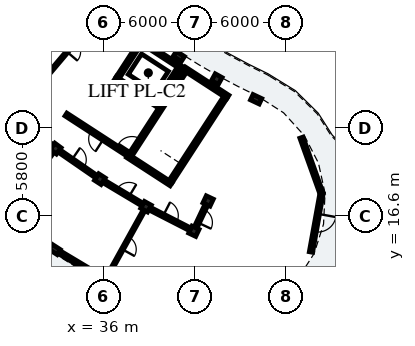
"""IFC4 building model, lengths in metres.
Left out: names, types, materials, properties, quantities, classifications, styles, units other than length and angle.
Written with IfcOpenShell. Run it as: python <this file> out.ifc"""

import sys

from ifc_helpers import new_model, si_unit, direction, frame, frame_2d, origin, origin_2d, place, context, subcontext, project, spatial, rectangle, extrude, element, fill, save


model = new_model("IFC4")
c1 = context("Model", 3, precision=1e-05, world=origin(), true_north=direction((0.0, 1.0)))
c2 = subcontext(c1, "Body", "Model", "MODEL_VIEW")
j1 = project(units=[si_unit("LENGTHUNIT", "METRE"), si_unit("PLANEANGLEUNIT", "RADIAN")], contexts=[c1])
p1 = place(None, origin())
s1 = spatial("IfcSite", under=j1, at=p1, CompositionType="ELEMENT")
p2 = place(p1, origin())
s2 = spatial("IfcBuilding", under=s1, at=p2, CompositionType="ELEMENT")
p3 = place(p2, frame((0.0, 0.0, 35.72)))
s3 = spatial("IfcBuildingStorey", under=s2, at=p3, CompositionType="ELEMENT", Elevation=35.72)
p4 = place(p3, frame((40.413, 18.882, 0.0), z_axis=(0.0, 0.0, 1.0), x_axis=(0.544629435258, 0.838676802022, 0.0)))
e1 = element("IfcWall", 1, at=p4, inside=s3, PredefinedType="SHEAR", context=c2, shape_type="SweptSolid", body=[
    extrude(rectangle(XDim=6.6, YDim=0.25, at=frame_2d((3.3, 0.0))), origin(), (0.0, 0.0, 1.0), 3.11),
])
p5 = place(p3, frame((44.18, 24.454, 0.0), z_axis=(0.0, 0.0, 1.0), x_axis=(-0.838699580527, 0.544594356953, 0.0)))
e2 = element("IfcWall", 2, at=p5, inside=s3, PredefinedType="SHEAR", context=c2, shape_type="SweptSolid", body=[
    extrude(rectangle(XDim=3.42, YDim=0.25, at=frame_2d((1.71, 0.0))), origin(), (0.0, 0.0, 1.0), 3.11),
])
p6 = place(p3, frame((40.449, 18.709, 0.0), z_axis=(0.0, 0.0, 1.0), x_axis=(-0.838678407117, 0.544626963559, 0.0)))
e3 = element("IfcWall", 3, at=p6, inside=s3, PredefinedType="SHEAR", context=c2, shape_type="SweptSolid", body=[
    extrude(rectangle(XDim=3.42, YDim=0.25, at=frame_2d((1.71, 0.0))), origin(), (0.0, 0.0, 1.0), 3.11),
])
p7 = place(p3, frame((37.754, 20.608, 0.0), z_axis=(0.0, 0.0, 1.0), x_axis=(0.544655453679, 0.838659905312, 0.0)))
e4 = element("IfcWall", 4, at=p7, inside=s3, PredefinedType="SHEAR", context=c2, shape_type="SweptSolid", body=[
    extrude(rectangle(XDim=6.6, YDim=0.25, at=frame_2d((3.3, 0.0))), origin(), (0.0, 0.0, 1.0), 3.11),
])
p8 = place(p7, frame((0.22, 0.0, 0.0)))
e5 = element("IfcOpeningElement", 5, at=p8, cuts=e4, PredefinedType="OPENING", context=c2, shape_type="SweptSolid", body=[
    extrude(rectangle(XDim=1.05, YDim=2.15, at=frame_2d((0.525, 1.075))), frame((0.0, 0.135, 0.0), z_axis=(0.0, -1.0, 0.0), x_axis=(1.0, 0.0, 0.0)), (0.0, 0.0, 1.0), 0.27),
])
p9 = place(p3, frame((39.516, 23.917, 0.0), z_axis=(0.0, 0.0, 1.0), x_axis=(-0.838660840752, 0.544654013286, 0.0)))
e6 = element("IfcWall", 6, at=p9, inside=s3, PredefinedType="SHEAR", context=c2, shape_type="SweptSolid", body=[
    extrude(rectangle(XDim=3.26, YDim=0.23, at=frame_2d((1.63, 0.0))), origin(), (0.0, 0.0, 1.0), 3.11),
])
p10 = place(p9, frame((0.9, 0.0, 0.0)))
e7 = element("IfcOpeningElement", 7, at=p10, cuts=e6, PredefinedType="OPENING", context=c2, shape_type="SweptSolid", body=[
    extrude(rectangle(XDim=1.0, YDim=2.15, at=frame_2d((0.5, 1.075))), frame((0.0, 0.125, 0.0), z_axis=(0.0, -1.0, 0.0), x_axis=(1.0, 0.0, 0.0)), (0.0, 0.0, 1.0), 0.25),
])
p11 = place(p3, frame((41.112, 26.375, 0.0), z_axis=(0.0, 0.0, 1.0), x_axis=(-0.838638623546, 0.544688221919, 0.0)))
e8 = element("IfcWall", 8, at=p11, inside=s3, PredefinedType="SHEAR", context=c2, shape_type="SweptSolid", body=[
    extrude(rectangle(XDim=3.26, YDim=0.23, at=frame_2d((1.63, 0.0))), origin(), (0.0, 0.0, 1.0), 3.11),
])
p12 = place(p3, frame((39.482, 24.077, 0.0), z_axis=(0.0, 0.0, 1.0), x_axis=(0.544686387605, 0.838639814913, 0.0)))
e9 = element("IfcWall", 9, at=p12, inside=s3, PredefinedType="SHEAR", context=c2, shape_type="SweptSolid", body=[
    extrude(rectangle(XDim=2.7, YDim=0.23, at=frame_2d((1.35, 0.0))), origin(), (0.0, 0.0, 1.0), 3.11),
])
p13 = place(p3, frame((36.941, 25.727, 0.0), z_axis=(0.0, 0.0, 1.0), x_axis=(0.544622789439, 0.838681117722, 0.0)))
e10 = element("IfcWall", 10, at=p13, inside=s3, PredefinedType="SHEAR", context=c2, shape_type="SweptSolid", body=[
    extrude(rectangle(XDim=2.7, YDim=0.23, at=frame_2d((1.35, 0.0))), origin(), (0.0, 0.0, 1.0), 3.11),
])
p14 = place(p3, frame((32.85, 21.052, 0.0), z_axis=(0.0, 0.0, 1.0), x_axis=(-0.594822786751, -0.803856860617, 0.0)))
e11 = element("IfcColumn", 11, at=p14, inside=s3, PredefinedType="COLUMN", context=c2, shape_type="SweptSolid", body=[
    extrude(rectangle(XDim=0.51, YDim=0.51, at=origin_2d()), origin(), (0.0, 0.0, 1.0), 3.125),
])
p15 = place(p3, frame((40.954, 27.116, 0.0), z_axis=(0.0, 0.0, 1.0), x_axis=(-0.540974471368, -0.841039012964, 0.0)))
e12 = element("IfcColumn", 12, at=p15, inside=s3, PredefinedType="PILASTER", context=c2, shape_type="SweptSolid", body=[
    extrude(rectangle(XDim=0.39, YDim=0.63, at=origin_2d()), origin(), (0.0, 0.0, 1.0), 3.125),
])
p16 = place(p3, frame((35.76, 19.042, 0.0), z_axis=(0.0, 0.0, 1.0), x_axis=(-0.540974471368, -0.841039012964, 0.0)))
e13 = element("IfcColumn", 13, at=p16, inside=s3, PredefinedType="COLUMN", context=c2, shape_type="SweptSolid", body=[
    extrude(rectangle(XDim=0.51, YDim=0.51, at=origin_2d()), origin(), (0.0, 0.0, 1.0), 3.125),
])
p17 = place(p3, frame((32.785, 14.416, 0.0), z_axis=(0.0, 0.0, 1.0), x_axis=(-0.540974471368, -0.841039012964, 0.0)))
e14 = element("IfcColumn", 14, at=p17, inside=s3, PredefinedType="PILASTER", context=c2, shape_type="SweptSolid", body=[
    extrude(rectangle(XDim=0.39, YDim=0.63, at=origin_2d()), origin(), (0.0, 0.0, 1.0), 3.125),
])
for number, where, z_axis, x_axis in (
    (15, (43.45, 25.623, 0.0), (0.0, 0.0, 1.0), (-0.485, -0.875, 0.0)),
    (16, (38.796, 17.227, 0.0), (0.0, 0.0, 1.0), (-0.485, -0.875, 0.0)),
):
    element("IfcColumn", number, at=place(p3, frame(where, z_axis=z_axis, x_axis=x_axis)), inside=s3, PredefinedType="COLUMN", context=c2, shape_type="SweptSolid", body=[
        extrude(rectangle(XDim=0.51, YDim=0.51, at=origin_2d()), origin(), (0.0, 0.0, 1.0), 3.125),
    ])
p18 = place(p3, frame((46.039, 24.297, 0.0), z_axis=(0.0, 0.0, 1.0), x_axis=(-0.426568739901, -0.904455145454, 0.0)))
e17 = element("IfcColumn", 17, at=p18, inside=s3, PredefinedType="PILASTER", context=c2, shape_type="SweptSolid", body=[
    extrude(rectangle(XDim=0.39, YDim=0.63, at=origin_2d()), origin(), (0.0, 0.0, 1.0), 3.125),
])
for number, where, z_axis, x_axis in (
    (18, (42.882, 17.604, 0.0), (0.0, 0.0, 1.0), (-0.427, -0.904, 0.0)),
    (19, (41.944, 15.614, 0.0), (0.0, 0.0, 1.0), (-0.427, -0.904, 0.0)),
):
    element("IfcColumn", number, at=place(p3, frame(where, z_axis=z_axis, x_axis=x_axis)), inside=s3, PredefinedType="COLUMN", context=c2, shape_type="SweptSolid", body=[
        extrude(rectangle(XDim=0.51, YDim=0.51, at=origin_2d()), origin(), (0.0, 0.0, 1.0), 3.125),
    ])
p19 = place(p3, frame((29.763, 16.502, 0.0), z_axis=(0.0, 0.0, 1.0), x_axis=(0.822878299875, -0.568217655125, 0.0)))
e20 = element("IfcWall", 20, at=p19, inside=s3, PredefinedType="SOLIDWALL", context=c2, shape_type="SweptSolid", body=[
    extrude(rectangle(XDim=3.507, YDim=0.22, at=frame_2d((1.753, 0.0))), origin(), (0.0, 0.0, 1.0), 2.355),
])
p20 = place(p19, frame((1.213, 0.0, 0.55)))
e21 = element("IfcOpeningElement", 21, at=p20, cuts=e20, PredefinedType="OPENING", context=c2, shape_type="SweptSolid", body=[
    extrude(rectangle(XDim=1.08, YDim=1.45, at=frame_2d((0.54, 0.725))), frame((0.0, 0.12, 0.0), z_axis=(0.0, -1.0, 0.0), x_axis=(1.0, 0.0, 0.0)), (0.0, 0.0, 1.0), 0.24),
])
p21 = place(p3, frame((32.927, 14.332, 0.0), z_axis=(0.0, 0.0, 1.0), x_axis=(0.858272027283, -0.513195018666, 0.0)))
e22 = element("IfcWall", 22, at=p21, inside=s3, PredefinedType="SOLIDWALL", context=c2, shape_type="SweptSolid", body=[
    extrude(rectangle(XDim=3.507, YDim=0.22, at=frame_2d((1.753, 0.0))), origin(), (0.0, 0.0, 1.0), 2.355),
])
p22 = place(p21, frame((1.063, 0.0, 0.55)))
e23 = element("IfcOpeningElement", 23, at=p22, cuts=e22, PredefinedType="OPENING", context=c2, shape_type="SweptSolid", body=[
    extrude(rectangle(XDim=1.38, YDim=1.56, at=frame_2d((0.69, 0.78))), frame((0.0, 0.12, 0.0), z_axis=(0.0, -1.0, 0.0), x_axis=(1.0, 0.0, 0.0)), (0.0, 0.0, 1.0), 0.24),
])
p23 = place(p3, frame((49.022, 21.772, 0.0), z_axis=(0.0, 0.0, 1.0), x_axis=(0.337903065186, -0.941180917007, 0.0)))
e24 = element("IfcWall", 24, at=p23, inside=s3, PredefinedType="SOLIDWALL", context=c2, shape_type="SweptSolid", body=[
    extrude(rectangle(XDim=3.908, YDim=0.22, at=frame_2d((1.954, 0.0))), origin(), (0.0, 0.0, 1.0), 2.355),
])
p24 = place(p23, frame((1.029, 0.0, 0.4)))
e25 = element("IfcOpeningElement", 25, at=p24, cuts=e24, PredefinedType="OPENING", context=c2, shape_type="SweptSolid", body=[
    extrude(rectangle(XDim=1.85, YDim=1.72, at=frame_2d((0.925, 0.86))), frame((0.0, 0.12, 0.0), z_axis=(0.0, -1.0, 0.0), x_axis=(1.0, 0.0, 0.0)), (0.0, 0.0, 1.0), 0.24),
])
p25 = place(p3, frame((50.343, 18.094, 0.0), z_axis=(0.0, 0.0, 1.0), x_axis=(-0.177978291347, -0.984034413935, 0.0)))
e26 = element("IfcWall", 26, at=p25, inside=s3, PredefinedType="SOLIDWALL", context=c2, shape_type="SweptSolid", body=[
    extrude(rectangle(XDim=3.908, YDim=0.22, at=frame_2d((1.954, 0.0))), origin(), (0.0, 0.0, 1.0), 2.355),
])
p26 = place(p25, frame((1.354, 0.0, 0.0)))
e27 = element("IfcOpeningElement", 27, at=p26, cuts=e26, PredefinedType="OPENING", context=c2, shape_type="SweptSolid", body=[
    extrude(rectangle(XDim=1.2, YDim=2.15, at=frame_2d((0.6, 1.075))), frame((0.0, 0.12, 0.0), z_axis=(0.0, -1.0, 0.0), x_axis=(1.0, 0.0, 0.0)), (0.0, 0.0, 1.0), 0.24),
])
p27 = place(p3, frame((37.639, 20.623, 0.0), z_axis=(0.0, 0.0, 1.0), x_axis=(-0.838681446513, 0.544622283124, 0.0)))
e28 = element("IfcWall", 28, at=p27, inside=s3, PredefinedType="PARTITIONING", context=c2, shape_type="SweptSolid", body=[
    extrude(rectangle(XDim=4.9, YDim=0.22, at=frame_2d((2.45, 0.0))), origin(), (0.0, 0.0, 1.0), 2.34),
])
p28 = place(p27, frame((1.95, 0.0, 0.0)))
e29 = element("IfcOpeningElement", 29, at=p28, cuts=e28, PredefinedType="OPENING", context=c2, shape_type="SweptSolid", body=[
    extrude(rectangle(XDim=0.98, YDim=2.14, at=frame_2d((0.49, 1.07))), frame((0.0, 0.12, 0.0), z_axis=(0.0, -1.0, 0.0), x_axis=(1.0, 0.0, 0.0)), (0.0, 0.0, 1.0), 0.24),
])
p29 = place(p3, frame((36.021, 30.269, 0.0), z_axis=(0.0, 0.0, 1.0), x_axis=(-0.646121311019, -0.763234728932, 0.0)))
e30 = element("IfcWall", 30, at=p29, inside=s3, PredefinedType="PARTITIONING", context=c2, shape_type="SweptSolid", body=[
    extrude(rectangle(XDim=6.6, YDim=0.125, at=frame_2d((3.3, 0.0))), origin(), (0.0, 0.0, 1.0), 2.37),
])
p30 = place(p29, frame((2.855, 0.0, 0.0)))
e31 = element("IfcOpeningElement", 31, at=p30, cuts=e30, PredefinedType="OPENING", context=c2, shape_type="SweptSolid", body=[
    extrude(rectangle(XDim=0.89, YDim=2.1, at=frame_2d((0.445, 1.05))), frame((0.0, 0.073, 0.0), z_axis=(0.0, -1.0, 0.0), x_axis=(1.0, 0.0, 0.0)), (0.0, 0.0, 1.0), 0.145),
])
p31 = place(p3, frame((30.351, 23.03, 0.0), z_axis=(0.0, 0.0, 1.0), x_axis=(0.783965548427, -0.620804332201, 0.0)))
e32 = element("IfcWall", 32, at=p31, inside=s3, PredefinedType="PARTITIONING", context=c2, shape_type="SweptSolid", body=[
    extrude(rectangle(XDim=2.837, YDim=0.195, at=frame_2d((1.418, 0.0))), origin(), (0.0, 0.0, 1.0), 2.37),
])
p32 = place(p31, frame((0.934, 0.0, 0.0)))
e33 = element("IfcOpeningElement", 33, at=p32, cuts=e32, PredefinedType="OPENING", context=c2, shape_type="SweptSolid", body=[
    extrude(rectangle(XDim=0.97, YDim=2.15, at=frame_2d((0.485, 1.075))), frame((0.0, 0.107, 0.0), z_axis=(0.0, -1.0, 0.0), x_axis=(1.0, 0.0, 0.0)), (0.0, 0.0, 1.0), 0.215),
])
p33 = place(p3, frame((32.612, 20.73, 0.0), z_axis=(0.0, 0.0, 1.0), x_axis=(-0.59482622273, -0.803854318116, 0.0)))
e34 = element("IfcWall", 34, at=p33, inside=s3, PredefinedType="PARTITIONING", context=c2, shape_type="SweptSolid", body=[
    extrude(rectangle(XDim=4.7, YDim=0.125, at=frame_2d((2.35, 0.0))), origin(), (0.0, 0.0, 1.0), 2.37),
])
p34 = place(p33, frame((1.905, 0.0, 0.0)))
e35 = element("IfcOpeningElement", 35, at=p34, cuts=e34, PredefinedType="OPENING", context=c2, shape_type="SweptSolid", body=[
    extrude(rectangle(XDim=0.89, YDim=2.1, at=frame_2d((0.445, 1.05))), frame((0.0, 0.073, 0.0), z_axis=(0.0, -1.0, 0.0), x_axis=(1.0, 0.0, 0.0)), (0.0, 0.0, 1.0), 0.145),
])
p35 = place(p3, frame((33.138, 20.853, 0.0), z_axis=(0.0, 0.0, 1.0), x_axis=(0.822870075235, -0.568229565653, 0.0)))
e36 = element("IfcWall", 36, at=p35, inside=s3, PredefinedType="PARTITIONING", context=c2, shape_type="SweptSolid", body=[
    extrude(rectangle(XDim=2.837, YDim=0.195, at=frame_2d((1.418, 0.0))), origin(), (0.0, 0.0, 1.0), 2.37),
])
p36 = place(p35, frame((0.944, 0.0, 0.0)))
e37 = element("IfcOpeningElement", 37, at=p36, cuts=e36, PredefinedType="OPENING", context=c2, shape_type="SweptSolid", body=[
    extrude(rectangle(XDim=0.95, YDim=2.13, at=frame_2d((0.475, 1.065))), frame((0.0, 0.107, 0.0), z_axis=(0.0, -1.0, 0.0), x_axis=(1.0, 0.0, 0.0)), (0.0, 0.0, 1.0), 0.215),
])
p37 = place(p3, frame((36.061, 18.862, 0.0), z_axis=(0.0, 0.0, 1.0), x_axis=(0.858281647443, -0.51317892948, 0.0)))
e38 = element("IfcWall", 38, at=p37, inside=s3, PredefinedType="PARTITIONING", context=c2, shape_type="SweptSolid", body=[
    extrude(rectangle(XDim=2.837, YDim=0.195, at=frame_2d((1.418, 0.0))), origin(), (0.0, 0.0, 1.0), 2.37),
])
p38 = place(p37, frame((0.954, 0.0, 0.0)))
e39 = element("IfcOpeningElement", 39, at=p38, cuts=e38, PredefinedType="OPENING", context=c2, shape_type="SweptSolid", body=[
    extrude(rectangle(XDim=0.93, YDim=2.12, at=frame_2d((0.465, 1.06))), frame((0.0, 0.107, 0.0), z_axis=(0.0, -1.0, 0.0), x_axis=(1.0, 0.0, 0.0)), (0.0, 0.0, 1.0), 0.215),
])
p39 = place(p3, frame((38.602, 16.877, 0.0), z_axis=(0.0, 0.0, 1.0), x_axis=(-0.484813534336, -0.874617537513, 0.0)))
e40 = element("IfcWall", 40, at=p39, inside=s3, PredefinedType="PARTITIONING", context=c2, shape_type="SweptSolid", body=[
    extrude(rectangle(XDim=4.7, YDim=0.125, at=frame_2d((2.35, 0.0))), origin(), (0.0, 0.0, 1.0), 2.37),
])
p40 = place(p39, frame((1.895, 0.0, 0.0)))
e41 = element("IfcOpeningElement", 41, at=p40, cuts=e40, PredefinedType="OPENING", context=c2, shape_type="SweptSolid", body=[
    extrude(rectangle(XDim=0.91, YDim=2.1, at=frame_2d((0.455, 1.05))), frame((0.0, 0.073, 0.0), z_axis=(0.0, -1.0, 0.0), x_axis=(1.0, 0.0, 0.0)), (0.0, 0.0, 1.0), 0.145),
])
p41 = place(p3, frame((39.107, 17.067, 0.0), z_axis=(0.0, 0.0, 1.0), x_axis=(0.890030590607, -0.45590080915, 0.0)))
e42 = element("IfcWall", 42, at=p41, inside=s3, PredefinedType="PARTITIONING", context=c2, shape_type="SweptSolid", body=[
    extrude(rectangle(XDim=2.837, YDim=0.195, at=frame_2d((1.418, 0.0))), origin(), (0.0, 0.0, 1.0), 2.37),
])
p42 = place(p41, frame((0.924, 0.0, 0.0)))
e43 = element("IfcOpeningElement", 43, at=p42, cuts=e42, PredefinedType="OPENING", context=c2, shape_type="SweptSolid", body=[
    extrude(rectangle(XDim=0.99, YDim=2.16, at=frame_2d((0.495, 1.08))), frame((0.0, 0.107, 0.0), z_axis=(0.0, -1.0, 0.0), x_axis=(1.0, 0.0, 0.0)), (0.0, 0.0, 1.0), 0.215),
])
p43 = place(p3, frame((42.861, 17.559, 0.0), z_axis=(0.0, 0.0, 1.0), x_axis=(-0.426541520305, -0.904467982549, 0.0)))
e44 = element("IfcWall", 44, at=p43, inside=s3, PredefinedType="PARTITIONING", context=c2, shape_type="SweptSolid", body=[
    extrude(rectangle(XDim=2.1, YDim=0.195, at=frame_2d((1.05, 0.0))), origin(), (0.0, 0.0, 1.0), 2.37),
])
p44 = place(p43, frame((0.57, 0.0, 0.0)))
e45 = element("IfcOpeningElement", 45, at=p44, cuts=e44, PredefinedType="OPENING", context=c2, shape_type="SweptSolid", body=[
    extrude(rectangle(XDim=0.95, YDim=2.13, at=frame_2d((0.475, 1.065))), frame((0.0, 0.107, 0.0), z_axis=(0.0, -1.0, 0.0), x_axis=(1.0, 0.0, 0.0)), (0.0, 0.0, 1.0), 0.215),
])
p45 = place(p22, origin())
e46 = element("IfcWindow", 46, at=p45, inside=s3, PartitioningType="SINGLE_PANEL", PredefinedType="WINDOW", context=c2, shape_type="SweptSolid", body=[
    extrude(rectangle(XDim=1.38, YDim=1.56, at=frame_2d((0.69, 0.78))), frame((0.0, 0.03, 0.0), z_axis=(0.0, -1.0, 0.0), x_axis=(1.0, 0.0, 0.0)), (0.0, 0.0, 1.0), 0.06),
])
fill(e23, e46)
p46 = place(p24, origin())
e47 = element("IfcWindow", 47, at=p46, inside=s3, PartitioningType="SINGLE_PANEL", PredefinedType="WINDOW", context=c2, shape_type="SweptSolid", body=[
    extrude(rectangle(XDim=1.85, YDim=1.72, at=frame_2d((0.925, 0.86))), frame((0.0, 0.03, 0.0), z_axis=(0.0, -1.0, 0.0), x_axis=(1.0, 0.0, 0.0)), (0.0, 0.0, 1.0), 0.06),
])
fill(e25, e47)
p47 = place(p26, origin())
e48 = element("IfcDoor", 48, at=p47, inside=s3, OperationType="SINGLE_SWING_LEFT", PredefinedType="DOOR", context=c2, shape_type="SweptSolid", body=[
    extrude(rectangle(XDim=1.2, YDim=2.15, at=frame_2d((0.6, 1.075))), frame((0.0, 0.025, 0.0), z_axis=(0.0, -1.0, 0.0), x_axis=(1.0, 0.0, 0.0)), (0.0, 0.0, 1.0), 0.05),
])
fill(e27, e48)
p48 = place(p8, origin())
e49 = element("IfcDoor", 49, at=p48, inside=s3, OperationType="SINGLE_SWING_LEFT", PredefinedType="DOOR", context=c2, shape_type="SweptSolid", body=[
    extrude(rectangle(XDim=1.05, YDim=2.15, at=frame_2d((0.525, 1.075))), frame((0.0, 0.025, 0.0), z_axis=(0.0, -1.0, 0.0), x_axis=(1.0, 0.0, 0.0)), (0.0, 0.0, 1.0), 0.05),
])
fill(e5, e49)
p49 = place(p10, origin())
e50 = element("IfcDoor", 50, at=p49, inside=s3, OperationType="DOUBLE_DOOR_SLIDING", PredefinedType="DOOR", context=c2, shape_type="SweptSolid", body=[
    extrude(rectangle(XDim=1.0, YDim=2.15, at=frame_2d((0.5, 1.075))), frame((0.0, 0.025, 0.0), z_axis=(0.0, -1.0, 0.0), x_axis=(1.0, 0.0, 0.0)), (0.0, 0.0, 1.0), 0.05),
])
fill(e7, e50)
p50 = place(p28, origin())
e51 = element("IfcDoor", 51, at=p50, inside=s3, OperationType="SINGLE_SWING_LEFT", PredefinedType="DOOR", context=c2, shape_type="SweptSolid", body=[
    extrude(rectangle(XDim=0.98, YDim=2.14, at=frame_2d((0.49, 1.07))), frame((0.0, 0.025, 0.0), z_axis=(0.0, -1.0, 0.0), x_axis=(1.0, 0.0, 0.0)), (0.0, 0.0, 1.0), 0.05),
])
fill(e29, e51)
p51 = place(p36, origin())
e52 = element("IfcDoor", 52, at=p51, inside=s3, OperationType="SINGLE_SWING_LEFT", PredefinedType="DOOR", context=c2, shape_type="SweptSolid", body=[
    extrude(rectangle(XDim=0.95, YDim=2.13, at=frame_2d((0.475, 1.065))), frame((0.0, 0.025, 0.0), z_axis=(0.0, -1.0, 0.0), x_axis=(1.0, 0.0, 0.0)), (0.0, 0.0, 1.0), 0.05),
])
fill(e37, e52)
p52 = place(p38, origin())
e53 = element("IfcDoor", 53, at=p52, inside=s3, OperationType="SINGLE_SWING_RIGHT", PredefinedType="DOOR", context=c2, shape_type="SweptSolid", body=[
    extrude(rectangle(XDim=0.93, YDim=2.12, at=frame_2d((0.465, 1.06))), frame((0.0, 0.025, 0.0), z_axis=(0.0, -1.0, 0.0), x_axis=(1.0, 0.0, 0.0)), (0.0, 0.0, 1.0), 0.05),
])
fill(e39, e53)
p53 = place(p40, origin())
e54 = element("IfcDoor", 54, at=p53, inside=s3, OperationType="SINGLE_SWING_RIGHT", PredefinedType="DOOR", context=c2, shape_type="SweptSolid", body=[
    extrude(rectangle(XDim=0.91, YDim=2.1, at=frame_2d((0.455, 1.05))), frame((0.0, 0.025, 0.0), z_axis=(0.0, -1.0, 0.0), x_axis=(1.0, 0.0, 0.0)), (0.0, 0.0, 1.0), 0.05),
])
fill(e41, e54)
p54 = place(p42, origin())
e55 = element("IfcDoor", 55, at=p54, inside=s3, OperationType="SINGLE_SWING_LEFT", PredefinedType="DOOR", context=c2, shape_type="SweptSolid", body=[
    extrude(rectangle(XDim=0.99, YDim=2.16, at=frame_2d((0.495, 1.08))), frame((0.0, 0.025, 0.0), z_axis=(0.0, -1.0, 0.0), x_axis=(1.0, 0.0, 0.0)), (0.0, 0.0, 1.0), 0.05),
])
fill(e43, e55)
p55 = place(p44, origin())
e56 = element("IfcDoor", 56, at=p55, inside=s3, OperationType="SINGLE_SWING_RIGHT", PredefinedType="DOOR", context=c2, shape_type="SweptSolid", body=[
    extrude(rectangle(XDim=0.95, YDim=2.13, at=frame_2d((0.475, 1.065))), frame((0.0, 0.025, 0.0), z_axis=(0.0, -1.0, 0.0), x_axis=(1.0, 0.0, 0.0)), (0.0, 0.0, 1.0), 0.05),
])
fill(e45, e56)
save(model, sys.argv[1])
